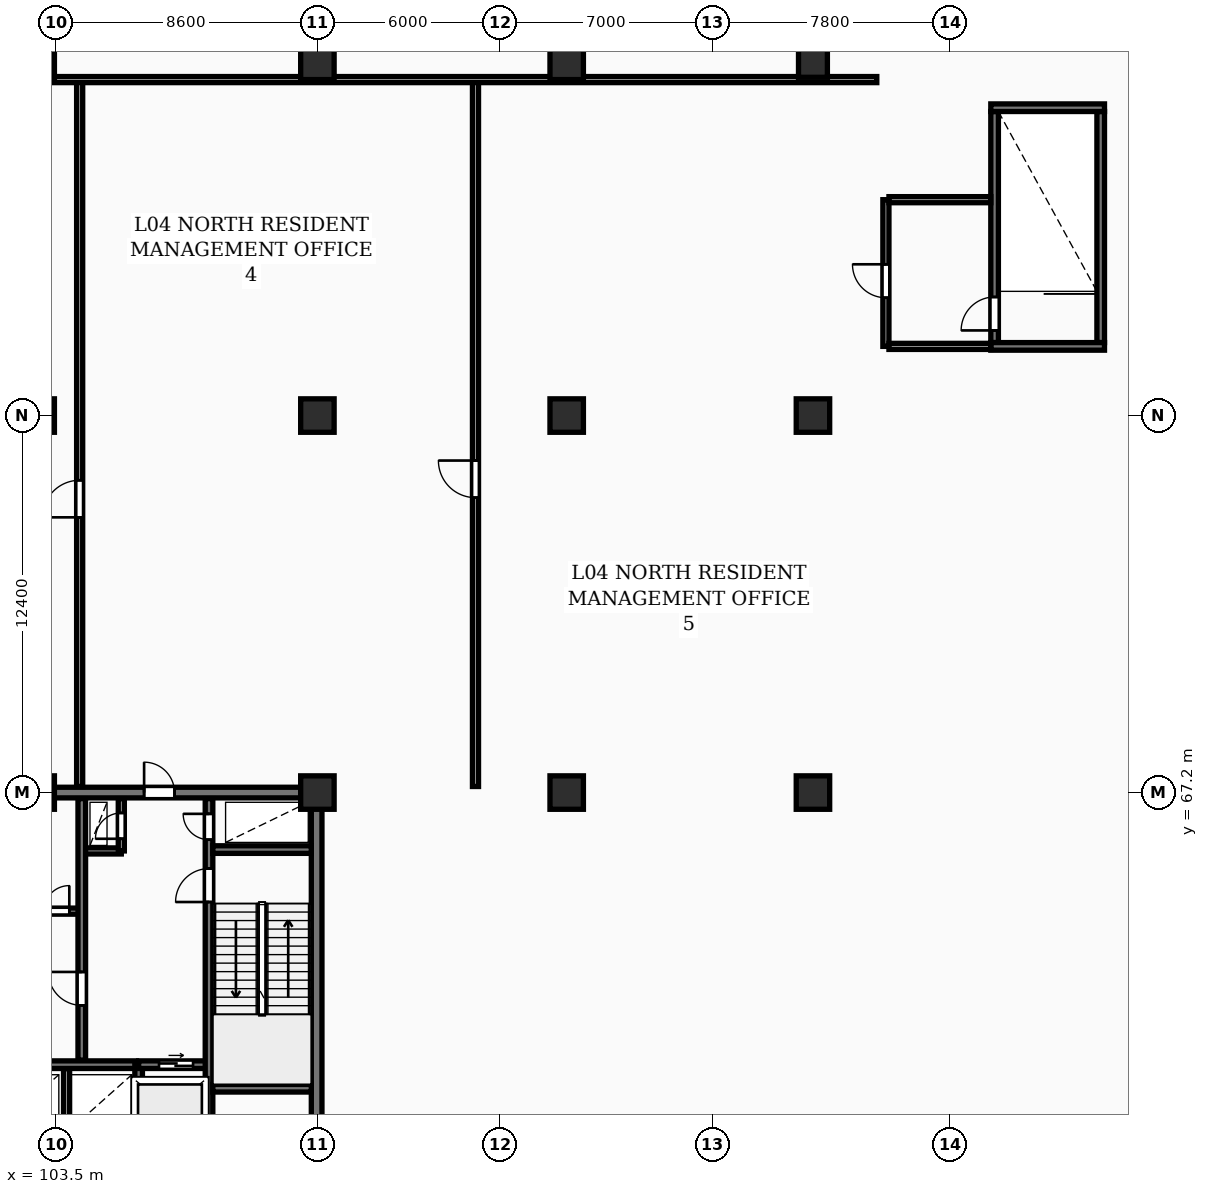
"""IFC4 building model, lengths in metres.
Left out: names, types, materials, properties, quantities, classifications, styles, units other than length and angle.
Written with IfcOpenShell. Run it as: python <this file> out.ifc"""

import sys

from ifc_helpers import new_model, si_unit, direction, frame, frame_2d, origin, origin_2d, place, context, subcontext, project, spatial, rectangle, circle, extrude, element, fill, save


model = new_model("IFC4")
c1 = context("Model", 3, precision=1e-05, world=origin(), true_north=direction((0.0, 1.0)))
c2 = subcontext(c1, "Body", "Model", "MODEL_VIEW")
j1 = project(units=[si_unit("LENGTHUNIT", "METRE"), si_unit("PLANEANGLEUNIT", "RADIAN")], contexts=[c1])
p1 = place(None, origin())
s1 = spatial("IfcSite", under=j1, at=p1, CompositionType="ELEMENT")
p2 = place(p1, origin())
s2 = spatial("IfcBuilding", under=s1, at=p2, CompositionType="ELEMENT")
p3 = place(p2, frame((0.0, 0.0, 19.0)))
s3 = spatial("IfcBuildingStorey", under=s2, at=p3, CompositionType="ELEMENT", Elevation=19.0)
for number, where, z_axis, x_axis in (
    (1, (102.9, 67.2, 0.0), (0.0, 0.0, 1.0), (1.0, 0.0, 0.0)),
    (2, (102.9, 79.6, 0.0), (0.0, 0.0, 1.0), (1.0, 0.0, 0.0)),
    (3, (102.9, 91.2, 0.0), (0.0, 0.0, 1.0), (1.0, 0.0, 0.0)),
    (4, (112.1, 67.2, 0.0), (0.0, 0.0, 1.0), (1.0, 0.0, 0.0)),
    (5, (112.1, 79.6, 0.0), (0.0, 0.0, 1.0), (1.0, 0.0, 0.0)),
    (6, (112.1, 91.2, 0.0), (0.0, 0.0, 1.0), (1.0, 0.0, 0.0)),
    (7, (120.3, 67.2, 0.0), (0.0, 0.0, 1.0), (1.0, 0.0, 0.0)),
    (8, (120.3, 79.6, 0.0), (0.0, 0.0, 1.0), (1.0, 0.0, 0.0)),
    (9, (120.3, 91.2, 0.0), (0.0, 0.0, 1.0), (1.0, 0.0, 0.0)),
    (10, (128.4, 67.2, 0.0), (0.0, 0.0, 1.0), (1.0, 0.0, 0.0)),
    (11, (128.4, 79.6, 0.0), (0.0, 0.0, 1.0), (1.0, 0.0, 0.0)),
):
    element("IfcColumn", number, at=place(p3, frame(where, z_axis=z_axis, x_axis=x_axis)), inside=s3, PredefinedType="COLUMN", context=c2, shape_type="SweptSolid", body=[
        extrude(rectangle(XDim=1.1, YDim=1.1, at=origin_2d()), origin(), (0.0, 0.0, 1.0), 5.0),
    ])
p4 = place(p3, frame((128.4, 91.2, 0.0), z_axis=(0.0, 0.0, 1.0), x_axis=(1.0, 0.0, 0.0)))
e12 = element("IfcColumn", 12, at=p4, inside=s3, PredefinedType="COLUMN", context=c2, shape_type="SweptSolid", body=[
    extrude(circle(Radius=0.475, at=origin_2d()), origin(), (0.0, 0.0, 1.0), 5.0),
])
p5 = place(p3, frame((112.075, 55.375, 0.0), z_axis=(0.0, 0.0, 1.0), x_axis=(0.0, 1.0, 0.0)))
e13 = element("IfcWall", 13, at=p5, inside=s3, PredefinedType="SHEAR", context=c2, shape_type="SweptSolid", body=[
    extrude(rectangle(XDim=11.65, YDim=0.35, at=frame_2d((5.825, 0.0))), origin(), (0.0, 0.0, 1.0), 5.0),
])
p6 = place(p3, frame((75.95, 67.2, 0.0), z_axis=(0.0, 0.0, 1.0), x_axis=(1.0, 0.0, 0.0)))
e14 = element("IfcWall", 14, at=p6, inside=s3, PredefinedType="SHEAR", context=c2, shape_type="SweptSolid", body=[
    extrude(rectangle(XDim=36.3, YDim=0.35, at=frame_2d((18.15, 0.0))), origin(), (0.0, 0.0, 1.0), 5.0),
])
p7 = place(p6, frame((5.25, 0.0, 0.0)))
e15 = element("IfcOpeningElement", 15, at=p7, cuts=e14, PredefinedType="OPENING", context=c2, shape_type="SweptSolid", body=[
    extrude(rectangle(XDim=1.0, YDim=2.15, at=frame_2d((0.5, 1.075))), frame((0.0, 0.185, 0.0), z_axis=(0.0, -1.0, 0.0), x_axis=(1.0, 0.0, 0.0)), (0.0, 0.0, 1.0), 0.37),
])
p8 = place(p6, frame((21.6, 0.0, 0.0)))
e16 = element("IfcOpeningElement", 16, at=p8, cuts=e14, PredefinedType="OPENING", context=c2, shape_type="SweptSolid", body=[
    extrude(rectangle(XDim=1.5, YDim=2.2, at=frame_2d((0.75, 1.1))), frame((0.0, 0.185, 0.0), z_axis=(0.0, -1.0, 0.0), x_axis=(1.0, 0.0, 0.0)), (0.0, 0.0, 1.0), 0.37),
])
p9 = place(p6, frame((30.45, 0.0, 0.0)))
e17 = element("IfcOpeningElement", 17, at=p9, cuts=e14, PredefinedType="OPENING", context=c2, shape_type="SweptSolid", body=[
    extrude(rectangle(XDim=1.0, YDim=2.15, at=frame_2d((0.5, 1.075))), frame((0.0, 0.185, 0.0), z_axis=(0.0, -1.0, 0.0), x_axis=(1.0, 0.0, 0.0)), (0.0, 0.0, 1.0), 0.37),
])
p10 = place(p3, frame((103.85, 55.4, 0.0), z_axis=(0.0, 0.0, 1.0), x_axis=(0.0, 1.0, 0.0)))
e18 = element("IfcWall", 18, at=p10, inside=s3, PredefinedType="PARTITIONING", context=c2, shape_type="SweptSolid", body=[
    extrude(rectangle(XDim=2.72, YDim=0.2, at=frame_2d((1.36, 0.0))), origin(), (0.0, 0.0, 1.0), 4.68),
])
p11 = place(p3, frame((101.55, 58.25, 0.0), z_axis=(0.0, 0.0, 1.0), x_axis=(1.0, 0.0, 0.0)))
e19 = element("IfcWall", 19, at=p11, inside=s3, PredefinedType="SHEAR", context=c2, shape_type="SweptSolid", body=[
    extrude(rectangle(XDim=4.6, YDim=0.25, at=frame_2d((2.3, 0.0))), origin(), (0.0, 0.0, 1.0), 5.0),
])
p12 = place(p3, frame((106.22, 55.4, 0.0), z_axis=(0.0, 0.0, 1.0), x_axis=(0.0, 1.0, 0.0)))
e20 = element("IfcWall", 20, at=p12, inside=s3, PredefinedType="SHEAR", context=c2, shape_type="SweptSolid", body=[
    extrude(rectangle(XDim=2.85, YDim=0.25, at=frame_2d((1.425, 0.0))), origin(), (0.0, 0.0, 1.0), 5.0),
])
p13 = place(p3, frame((106.22, 58.25, 0.0), z_axis=(0.0, 0.0, 1.0), x_axis=(1.0, 0.0, 0.0)))
e21 = element("IfcWall", 21, at=p13, inside=s3, PredefinedType="SHEAR", context=c2, shape_type="SweptSolid", body=[
    extrude(rectangle(XDim=2.46, YDim=0.25, at=frame_2d((1.23, 0.0))), origin(), (0.0, 0.0, 1.0), 5.0),
])
p14 = place(p13, frame((0.67, 0.0, 0.0)))
e22 = element("IfcOpeningElement", 22, at=p14, cuts=e21, PredefinedType="OPENING", context=c2, shape_type="SweptSolid", body=[
    extrude(rectangle(XDim=1.12, YDim=2.12, at=frame_2d((0.56, 1.06))), frame((0.0, 0.135, 0.0), z_axis=(0.0, -1.0, 0.0), x_axis=(1.0, 0.0, 0.0)), (0.0, 0.0, 1.0), 0.27),
])
p15 = place(p3, frame((84.42, 63.3, 0.0), z_axis=(0.0, 0.0, 1.0), x_axis=(1.0, 0.0, 0.0)))
e23 = element("IfcWall", 23, at=p15, inside=s3, PredefinedType="PARTITIONING", context=c2, shape_type="SweptSolid", body=[
    extrude(rectangle(XDim=19.83, YDim=0.2, at=frame_2d((9.915, 0.0))), origin(), (0.0, 0.0, 1.0), 4.68),
])
p16 = place(p15, frame((1.15, 0.0, 0.0)))
e24 = element("IfcOpeningElement", 24, at=p16, cuts=e23, PredefinedType="OPENING", context=c2, shape_type="SweptSolid", body=[
    extrude(rectangle(XDim=0.85, YDim=2.05, at=frame_2d((0.425, 1.025))), frame((0.0, 0.11, 0.0), z_axis=(0.0, -1.0, 0.0), x_axis=(1.0, 0.0, 0.0)), (0.0, 0.0, 1.0), 0.22),
])
p17 = place(p15, frame((3.25, 0.0, 0.0)))
e25 = element("IfcOpeningElement", 25, at=p17, cuts=e23, PredefinedType="OPENING", context=c2, shape_type="SweptSolid", body=[
    extrude(rectangle(XDim=0.85, YDim=2.05, at=frame_2d((0.425, 1.025))), frame((0.0, 0.11, 0.0), z_axis=(0.0, -1.0, 0.0), x_axis=(1.0, 0.0, 0.0)), (0.0, 0.0, 1.0), 0.22),
])
p18 = place(p15, frame((13.08, 0.0, 0.0)))
e26 = element("IfcOpeningElement", 26, at=p18, cuts=e23, PredefinedType="OPENING", context=c2, shape_type="SweptSolid", body=[
    extrude(rectangle(XDim=1.5, YDim=2.2, at=frame_2d((0.75, 1.1))), frame((0.0, 0.11, 0.0), z_axis=(0.0, -1.0, 0.0), x_axis=(1.0, 0.0, 0.0)), (0.0, 0.0, 1.0), 0.22),
])
p19 = place(p15, frame((5.53, 0.0, 0.0)))
e27 = element("IfcOpeningElement", 27, at=p19, cuts=e23, PredefinedType="OPENING", context=c2, shape_type="SweptSolid", body=[
    extrude(rectangle(XDim=0.88, YDim=2.06, at=frame_2d((0.44, 1.03))), frame((0.0, 0.11, 0.0), z_axis=(0.0, -1.0, 0.0), x_axis=(1.0, 0.0, 0.0)), (0.0, 0.0, 1.0), 0.22),
])
p20 = place(p15, frame((7.68, 0.0, 0.0)))
e28 = element("IfcOpeningElement", 28, at=p20, cuts=e23, PredefinedType="OPENING", context=c2, shape_type="SweptSolid", body=[
    extrude(rectangle(XDim=0.88, YDim=2.06, at=frame_2d((0.44, 1.03))), frame((0.0, 0.11, 0.0), z_axis=(0.0, -1.0, 0.0), x_axis=(1.0, 0.0, 0.0)), (0.0, 0.0, 1.0), 0.22),
])
p21 = place(p15, frame((10.43, 0.0, 0.0)))
e29 = element("IfcOpeningElement", 29, at=p21, cuts=e23, PredefinedType="OPENING", context=c2, shape_type="SweptSolid", body=[
    extrude(rectangle(XDim=0.85, YDim=2.05, at=frame_2d((0.425, 1.025))), frame((0.0, 0.11, 0.0), z_axis=(0.0, -1.0, 0.0), x_axis=(1.0, 0.0, 0.0)), (0.0, 0.0, 1.0), 0.22),
])
p22 = place(p15, frame((16.23, 0.0, 0.0)))
e30 = element("IfcOpeningElement", 30, at=p22, cuts=e23, PredefinedType="OPENING", context=c2, shape_type="SweptSolid", body=[
    extrude(rectangle(XDim=0.96, YDim=2.1, at=frame_2d((0.48, 1.05))), frame((0.0, 0.11, 0.0), z_axis=(0.0, -1.0, 0.0), x_axis=(1.0, 0.0, 0.0)), (0.0, 0.0, 1.0), 0.22),
])
p23 = place(p15, frame((18.68, 0.0, 0.0)))
e31 = element("IfcOpeningElement", 31, at=p23, cuts=e23, PredefinedType="OPENING", context=c2, shape_type="SweptSolid", body=[
    extrude(rectangle(XDim=0.84, YDim=2.04, at=frame_2d((0.42, 1.02))), frame((0.0, 0.11, 0.0), z_axis=(0.0, -1.0, 0.0), x_axis=(1.0, 0.0, 0.0)), (0.0, 0.0, 1.0), 0.22),
])
p24 = place(p3, frame((104.45, 65.28, 0.0), z_axis=(0.0, 0.0, 1.0), x_axis=(1.0, 0.0, 0.0)))
e32 = element("IfcWall", 32, at=p24, inside=s3, PredefinedType="PARTITIONING", context=c2, shape_type="SweptSolid", body=[
    extrude(rectangle(XDim=1.2, YDim=0.2, at=frame_2d((0.6, 0.0))), origin(), (0.0, 0.0, 1.0), 4.68),
])
p25 = place(p3, frame((105.65, 65.28, 0.0), z_axis=(0.0, 0.0, 1.0), x_axis=(0.0, 1.0, 0.0)))
e33 = element("IfcWall", 33, at=p25, inside=s3, PredefinedType="PARTITIONING", context=c2, shape_type="SweptSolid", body=[
    extrude(rectangle(XDim=1.72, YDim=0.2, at=frame_2d((0.86, 0.0))), origin(), (0.0, 0.0, 1.0), 4.68),
])
p26 = place(p25, frame((0.4, 0.0, 0.0)))
e34 = element("IfcOpeningElement", 34, at=p26, cuts=e33, PredefinedType="OPENING", context=c2, shape_type="SweptSolid", body=[
    extrude(rectangle(XDim=0.85, YDim=2.05, at=frame_2d((0.425, 1.025))), frame((0.0, 0.11, 0.0), z_axis=(0.0, -1.0, 0.0), x_axis=(1.0, 0.0, 0.0)), (0.0, 0.0, 1.0), 0.22),
])
p27 = place(p3, frame((104.35, 58.4, 0.0), z_axis=(0.0, 0.0, 1.0), x_axis=(0.0, 1.0, 0.0)))
e35 = element("IfcWall", 35, at=p27, inside=s3, PredefinedType="SHEAR", context=c2, shape_type="SweptSolid", body=[
    extrude(rectangle(XDim=8.6, YDim=0.25, at=frame_2d((4.3, 0.0))), origin(), (0.0, 0.0, 1.0), 5.0),
])
p28 = place(p27, frame((1.8, 0.0, 0.0)))
e36 = element("IfcOpeningElement", 36, at=p28, cuts=e35, PredefinedType="OPENING", context=c2, shape_type="SweptSolid", body=[
    extrude(rectangle(XDim=1.1, YDim=2.1, at=frame_2d((0.55, 1.05))), frame((0.0, 0.135, 0.0), z_axis=(0.0, -1.0, 0.0), x_axis=(1.0, 0.0, 0.0)), (0.0, 0.0, 1.0), 0.27),
])
p29 = place(p3, frame((108.535, 55.4, 0.0), z_axis=(0.0, 0.0, 1.0), x_axis=(0.0, 1.0, 0.0)))
e37 = element("IfcWall", 37, at=p29, inside=s3, PredefinedType="SHEAR", context=c2, shape_type="SweptSolid", body=[
    extrude(rectangle(XDim=11.6, YDim=0.25, at=frame_2d((5.8, 0.0))), origin(), (0.0, 0.0, 1.0), 5.0),
])
p30 = place(p29, frame((8.2, 0.0, 0.0)))
e38 = element("IfcOpeningElement", 38, at=p30, cuts=e37, PredefinedType="OPENING", context=c2, shape_type="SweptSolid", body=[
    extrude(rectangle(XDim=1.1, YDim=2.1, at=frame_2d((0.55, 1.05))), frame((0.0, 0.135, 0.0), z_axis=(0.0, -1.0, 0.0), x_axis=(1.0, 0.0, 0.0)), (0.0, 0.0, 1.0), 0.27),
])
p31 = place(p29, frame((10.25, 0.0, 0.0)))
e39 = element("IfcOpeningElement", 39, at=p31, cuts=e37, PredefinedType="OPENING", context=c2, shape_type="SweptSolid", body=[
    extrude(rectangle(XDim=0.85, YDim=2.05, at=frame_2d((0.425, 1.025))), frame((0.0, 0.135, 0.0), z_axis=(0.0, -1.0, 0.0), x_axis=(1.0, 0.0, 0.0)), (0.0, 0.0, 1.0), 0.27),
])
for number, where, z_axis, x_axis in (
    (40, (108.66, 57.475, 0.0), (0.0, 0.0, 1.0), (1.0, 0.0, 0.0)),
    (41, (108.66, 65.325, 0.0), (0.0, 0.0, 1.0), (1.0, 0.0, 0.0)),
):
    element("IfcWall", number, at=place(p3, frame(where, z_axis=z_axis, x_axis=x_axis)), inside=s3, PredefinedType="SHEAR", context=c2, shape_type="SweptSolid", body=[
        extrude(rectangle(XDim=3.24, YDim=0.25, at=frame_2d((1.62, 0.0))), origin(), (0.0, 0.0, 1.0), 5.0),
    ])
p32 = place(p3, frame((134.375, 82.0, 0.0), z_axis=(0.0, 0.0, 1.0), x_axis=(0.0, 1.0, 0.0)))
e42 = element("IfcWall", 42, at=p32, inside=s3, PredefinedType="SHEAR", context=c2, shape_type="SweptSolid", body=[
    extrude(rectangle(XDim=7.6, YDim=0.25, at=frame_2d((3.8, 0.0))), origin(), (0.0, 0.0, 1.0), 5.0),
])
p33 = place(p32, frame((0.4, 0.0, 0.0)))
e43 = element("IfcOpeningElement", 43, at=p33, cuts=e42, PredefinedType="OPENING", context=c2, shape_type="SweptSolid", body=[
    extrude(rectangle(XDim=1.1, YDim=2.1, at=frame_2d((0.55, 1.05))), frame((0.0, 0.135, 0.0), z_axis=(0.0, -1.0, 0.0), x_axis=(1.0, 0.0, 0.0)), (0.0, 0.0, 1.0), 0.27),
])
p34 = place(p3, frame((137.865, 82.0, 0.0), z_axis=(0.0, 0.0, 1.0), x_axis=(0.0, 1.0, 0.0)))
e44 = element("IfcWall", 44, at=p34, inside=s3, PredefinedType="SHEAR", context=c2, shape_type="SweptSolid", body=[
    extrude(rectangle(XDim=7.6, YDim=0.25, at=frame_2d((3.8, 0.0))), origin(), (0.0, 0.0, 1.0), 5.0),
])
for number, where, z_axis, x_axis in (
    (45, (134.25, 81.875, 0.0), (0.0, 0.0, 1.0), (1.0, 0.0, 0.0)),
    (46, (134.25, 89.725, 0.0), (0.0, 0.0, 1.0), (1.0, 0.0, 0.0)),
):
    element("IfcWall", number, at=place(p3, frame(where, z_axis=z_axis, x_axis=x_axis)), inside=s3, PredefinedType="SHEAR", context=c2, shape_type="SweptSolid", body=[
        extrude(rectangle(XDim=3.74, YDim=0.25, at=frame_2d((1.87, 0.0))), origin(), (0.0, 0.0, 1.0), 5.0),
    ])
p35 = place(p3, frame((130.8, 81.875, 0.0), z_axis=(0.0, 0.0, 1.0), x_axis=(0.0, 1.0, 0.0)))
e47 = element("IfcWall", 47, at=p35, inside=s3, PredefinedType="PARTITIONING", context=c2, shape_type="SweptSolid", body=[
    extrude(rectangle(XDim=4.825, YDim=0.2, at=frame_2d((2.413, 0.0))), origin(), (0.0, 0.0, 1.0), 4.68),
])
p36 = place(p35, frame((1.6, 0.0, 0.0)))
e48 = element("IfcOpeningElement", 48, at=p36, cuts=e47, PredefinedType="OPENING", context=c2, shape_type="SweptSolid", body=[
    extrude(rectangle(XDim=1.1, YDim=2.15, at=frame_2d((0.55, 1.075))), frame((0.0, 0.11, 0.0), z_axis=(0.0, -1.0, 0.0), x_axis=(1.0, 0.0, 0.0)), (0.0, 0.0, 1.0), 0.22),
])
for number, where, z_axis, x_axis in (
    (49, (130.9, 81.875, 0.0), (0.0, 0.0, 1.0), (1.0, 0.0, 0.0)),
    (50, (130.9, 86.7, 0.0), (0.0, 0.0, 1.0), (1.0, 0.0, 0.0)),
):
    element("IfcWall", number, at=place(p3, frame(where, z_axis=z_axis, x_axis=x_axis)), inside=s3, PredefinedType="PARTITIONING", context=c2, shape_type="SweptSolid", body=[
        extrude(rectangle(XDim=3.35, YDim=0.2, at=frame_2d((1.675, 0.0))), origin(), (0.0, 0.0, 1.0), 4.68),
    ])
p37 = place(p3, frame((104.28, 67.4, 0.0), z_axis=(0.0, 0.0, 1.0), x_axis=(0.0, 1.0, 0.0)))
e51 = element("IfcWall", 51, at=p37, inside=s3, PredefinedType="PARTITIONING", context=c2, shape_type="SweptSolid", body=[
    extrude(rectangle(XDim=23.25, YDim=0.2, at=frame_2d((11.625, 0.0))), origin(), (0.0, 0.0, 1.0), 4.68),
])
p38 = place(p37, frame((8.852, 0.0, 0.0)))
e52 = element("IfcOpeningElement", 52, at=p38, cuts=e51, PredefinedType="OPENING", context=c2, shape_type="SweptSolid", body=[
    extrude(rectangle(XDim=1.22, YDim=2.18, at=frame_2d((0.61, 1.09))), frame((0.0, 0.11, 0.0), z_axis=(0.0, -1.0, 0.0), x_axis=(1.0, 0.0, 0.0)), (0.0, 0.0, 1.0), 0.22),
])
p39 = place(p3, frame((117.3, 67.4, 0.0), z_axis=(0.0, 0.0, 1.0), x_axis=(0.0, 1.0, 0.0)))
e53 = element("IfcWall", 53, at=p39, inside=s3, PredefinedType="PARTITIONING", context=c2, shape_type="SweptSolid", body=[
    extrude(rectangle(XDim=23.25, YDim=0.2, at=frame_2d((11.625, 0.0))), origin(), (0.0, 0.0, 1.0), 4.68),
])
p40 = place(p39, frame((9.5, 0.0, 0.0)))
e54 = element("IfcOpeningElement", 54, at=p40, cuts=e53, PredefinedType="OPENING", context=c2, shape_type="SweptSolid", body=[
    extrude(rectangle(XDim=1.22, YDim=2.18, at=frame_2d((0.61, 1.09))), frame((0.0, 0.11, 0.0), z_axis=(0.0, -1.0, 0.0), x_axis=(1.0, 0.0, 0.0)), (0.0, 0.0, 1.0), 0.22),
])
p41 = place(p3, frame((65.2, 90.65, 0.0), z_axis=(0.0, 0.0, 1.0), x_axis=(1.0, 0.0, 0.0)))
e55 = element("IfcWall", 55, at=p41, inside=s3, PredefinedType="PARTITIONING", context=c2, shape_type="SweptSolid", body=[
    extrude(rectangle(XDim=65.3, YDim=0.2, at=frame_2d((32.65, 0.0))), origin(), (0.0, 0.0, 1.0), 3.43),
])
p42 = place(p9, origin())
e56 = element("IfcDoor", 56, at=p42, inside=s3, OperationType="SINGLE_SWING_LEFT", PredefinedType="DOOR", context=c2, shape_type="SweptSolid", body=[
    extrude(rectangle(XDim=1.0, YDim=2.15, at=frame_2d((0.5, 1.075))), frame((0.0, 0.025, 0.0), z_axis=(0.0, -1.0, 0.0), x_axis=(1.0, 0.0, 0.0)), (0.0, 0.0, 1.0), 0.05),
])
fill(e17, e56)
p43 = place(p14, origin())
e57 = element("IfcDoor", 57, at=p43, inside=s3, OperationType="SLIDING_TO_RIGHT", PredefinedType="DOOR", context=c2, shape_type="SweptSolid", body=[
    extrude(rectangle(XDim=1.12, YDim=2.12, at=frame_2d((0.56, 1.06))), frame((0.0, 0.025, 0.0), z_axis=(0.0, -1.0, 0.0), x_axis=(1.0, 0.0, 0.0)), (0.0, 0.0, 1.0), 0.05),
])
fill(e22, e57)
p44 = place(p23, origin())
e58 = element("IfcDoor", 58, at=p44, inside=s3, OperationType="SINGLE_SWING_RIGHT", PredefinedType="DOOR", context=c2, shape_type="SweptSolid", body=[
    extrude(rectangle(XDim=0.84, YDim=2.04, at=frame_2d((0.42, 1.02))), frame((0.0, 0.025, 0.0), z_axis=(0.0, -1.0, 0.0), x_axis=(1.0, 0.0, 0.0)), (0.0, 0.0, 1.0), 0.05),
])
fill(e31, e58)
p45 = place(p26, origin())
e59 = element("IfcDoor", 59, at=p45, inside=s3, OperationType="SINGLE_SWING_LEFT", PredefinedType="DOOR", context=c2, shape_type="SweptSolid", body=[
    extrude(rectangle(XDim=0.85, YDim=2.05, at=frame_2d((0.425, 1.025))), frame((0.0, 0.025, 0.0), z_axis=(0.0, -1.0, 0.0), x_axis=(1.0, 0.0, 0.0)), (0.0, 0.0, 1.0), 0.05),
])
fill(e34, e59)
p46 = place(p28, origin())
e60 = element("IfcDoor", 60, at=p46, inside=s3, OperationType="SINGLE_SWING_RIGHT", PredefinedType="DOOR", context=c2, shape_type="SweptSolid", body=[
    extrude(rectangle(XDim=1.1, YDim=2.1, at=frame_2d((0.55, 1.05))), frame((0.0, 0.025, 0.0), z_axis=(0.0, -1.0, 0.0), x_axis=(1.0, 0.0, 0.0)), (0.0, 0.0, 1.0), 0.05),
])
fill(e36, e60)
p47 = place(p30, origin())
e61 = element("IfcDoor", 61, at=p47, inside=s3, OperationType="SINGLE_SWING_LEFT", PredefinedType="DOOR", context=c2, shape_type="SweptSolid", body=[
    extrude(rectangle(XDim=1.1, YDim=2.1, at=frame_2d((0.55, 1.05))), frame((0.0, 0.025, 0.0), z_axis=(0.0, -1.0, 0.0), x_axis=(1.0, 0.0, 0.0)), (0.0, 0.0, 1.0), 0.05),
])
fill(e38, e61)
p48 = place(p31, origin())
e62 = element("IfcDoor", 62, at=p48, inside=s3, OperationType="SINGLE_SWING_RIGHT", PredefinedType="DOOR", context=c2, shape_type="SweptSolid", body=[
    extrude(rectangle(XDim=0.85, YDim=2.05, at=frame_2d((0.425, 1.025))), frame((0.0, 0.025, 0.0), z_axis=(0.0, -1.0, 0.0), x_axis=(1.0, 0.0, 0.0)), (0.0, 0.0, 1.0), 0.05),
])
fill(e39, e62)
p49 = place(p33, origin())
e63 = element("IfcDoor", 63, at=p49, inside=s3, OperationType="SINGLE_SWING_LEFT", PredefinedType="DOOR", context=c2, shape_type="SweptSolid", body=[
    extrude(rectangle(XDim=1.1, YDim=2.1, at=frame_2d((0.55, 1.05))), frame((0.0, 0.025, 0.0), z_axis=(0.0, -1.0, 0.0), x_axis=(1.0, 0.0, 0.0)), (0.0, 0.0, 1.0), 0.05),
])
fill(e43, e63)
p50 = place(p36, origin())
e64 = element("IfcDoor", 64, at=p50, inside=s3, OperationType="SINGLE_SWING_RIGHT", PredefinedType="DOOR", context=c2, shape_type="SweptSolid", body=[
    extrude(rectangle(XDim=1.1, YDim=2.15, at=frame_2d((0.55, 1.075))), frame((0.0, 0.025, 0.0), z_axis=(0.0, -1.0, 0.0), x_axis=(1.0, 0.0, 0.0)), (0.0, 0.0, 1.0), 0.05),
])
fill(e48, e64)
p51 = place(p38, origin())
e65 = element("IfcDoor", 65, at=p51, inside=s3, OperationType="SINGLE_SWING_LEFT", PredefinedType="DOOR", context=c2, shape_type="SweptSolid", body=[
    extrude(rectangle(XDim=1.22, YDim=2.18, at=frame_2d((0.61, 1.09))), frame((0.0, 0.025, 0.0), z_axis=(0.0, -1.0, 0.0), x_axis=(1.0, 0.0, 0.0)), (0.0, 0.0, 1.0), 0.05),
])
fill(e52, e65)
p52 = place(p40, origin())
e66 = element("IfcDoor", 66, at=p52, inside=s3, OperationType="SINGLE_SWING_RIGHT", PredefinedType="DOOR", context=c2, shape_type="SweptSolid", body=[
    extrude(rectangle(XDim=1.22, YDim=2.18, at=frame_2d((0.61, 1.09))), frame((0.0, 0.025, 0.0), z_axis=(0.0, -1.0, 0.0), x_axis=(1.0, 0.0, 0.0)), (0.0, 0.0, 1.0), 0.05),
])
fill(e54, e66)
save(model, sys.argv[1])
